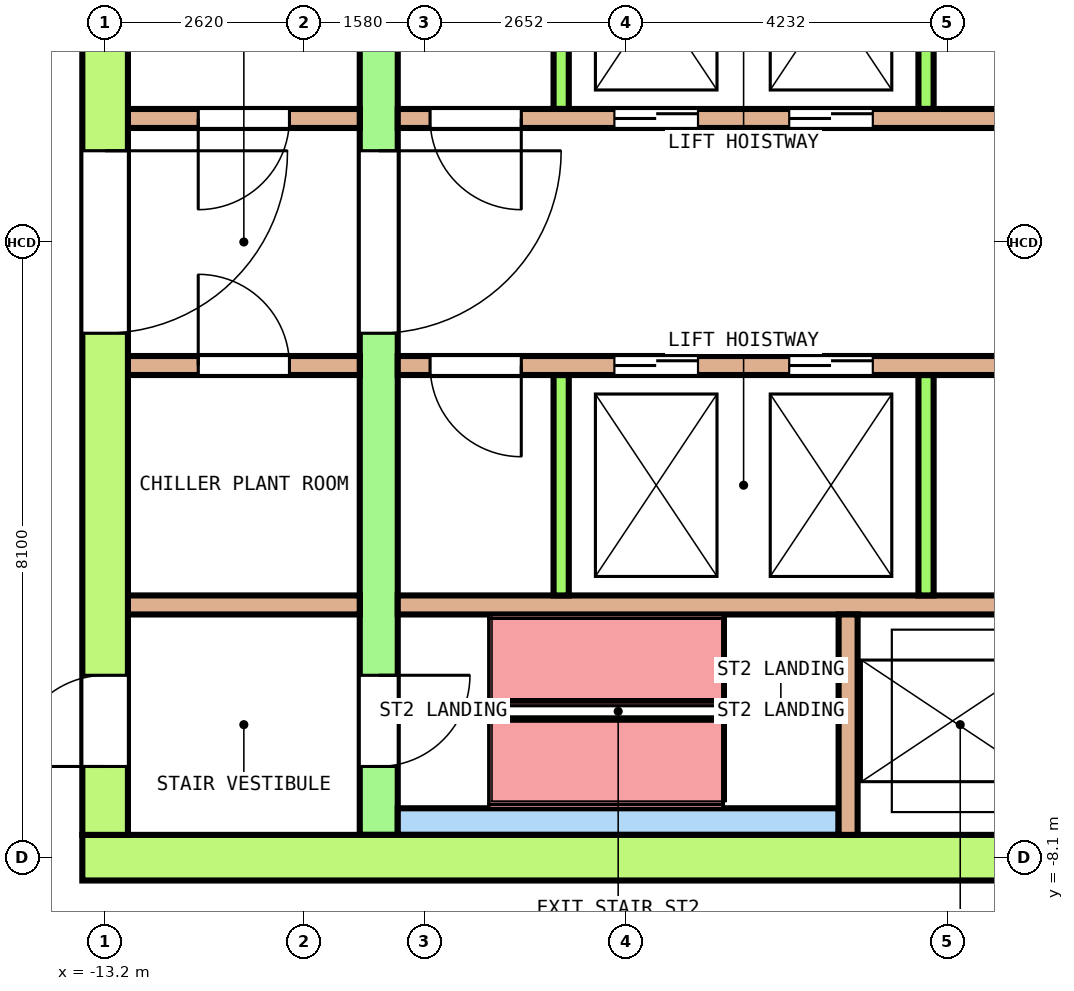
"""IFC4 building model, lengths in metres.
Left out: names, types, materials, properties, quantities, classifications, styles, units other than length and angle.
Written with IfcOpenShell. Run it as: python <this file> out.ifc"""

import sys

from ifc_helpers import new_model, si_unit, direction, frame, frame_2d, origin, place, context, subcontext, project, spatial, rectangle, extrude, element, fill, save


model = new_model("IFC4")
c1 = context("Model", 3, precision=1e-05, world=origin(), true_north=direction((0.0, 1.0)))
c2 = subcontext(c1, "Body", "Model", "MODEL_VIEW")
j1 = project(units=[si_unit("LENGTHUNIT", "METRE"), si_unit("PLANEANGLEUNIT", "RADIAN")], contexts=[c1])
p1 = place(None, origin())
s1 = spatial("IfcSite", under=j1, at=p1, CompositionType="ELEMENT")
p2 = place(p1, origin())
s2 = spatial("IfcBuilding", under=s1, at=p2, CompositionType="ELEMENT")
p3 = place(p2, frame((0.0, 0.0, 202.4)))
s3 = spatial("IfcBuildingStorey", under=s2, at=p3, CompositionType="ELEMENT", Elevation=202.4)
p4 = place(p3, frame((-13.5, -8.1, 0.0), z_axis=(0.0, 0.0, 1.0), x_axis=(1.0, 0.0, 0.0)))
e1 = element("IfcWall", 1, at=p4, inside=s3, PredefinedType="SHEAR", context=c2, shape_type="SweptSolid", body=[
    extrude(rectangle(XDim=27.0, YDim=0.6, at=frame_2d((13.5, 0.0))), origin(), (0.0, 0.0, 1.0), 8.7),
])
p5 = place(p4, frame((15.05, 0.0, 0.0)))
e2 = element("IfcOpeningElement", 2, at=p5, cuts=e1, PredefinedType="OPENING", context=c2, shape_type="SweptSolid", body=[
    extrude(rectangle(XDim=1.2, YDim=2.1, at=frame_2d((0.6, 1.05))), frame((0.0, 0.31, 0.0), z_axis=(0.0, -1.0, 0.0), x_axis=(1.0, 0.0, 0.0)), (0.0, 0.0, 1.0), 0.62),
])
p6 = place(p3, frame((-13.2, -7.8, 0.0), z_axis=(0.0, 0.0, 1.0), x_axis=(0.0, 1.0, 0.0)))
e3 = element("IfcWall", 3, at=p6, inside=s3, PredefinedType="SHEAR", context=c2, shape_type="SweptSolid", body=[
    extrude(rectangle(XDim=15.6, YDim=0.6, at=frame_2d((7.8, 0.0))), origin(), (0.0, 0.0, 1.0), 8.7),
])
p7 = place(p6, frame((6.6, 0.0, 0.0)))
e4 = element("IfcOpeningElement", 4, at=p7, cuts=e3, PredefinedType="OPENING", context=c2, shape_type="SweptSolid", body=[
    extrude(rectangle(XDim=2.4, YDim=2.1, at=frame_2d((1.2, 1.05))), frame((0.0, 0.31, 0.0), z_axis=(0.0, -1.0, 0.0), x_axis=(1.0, 0.0, 0.0)), (0.0, 0.0, 1.0), 0.62),
])
p8 = place(p6, frame((13.5, 0.0, 0.0)))
e5 = element("IfcOpeningElement", 5, at=p8, cuts=e3, PredefinedType="OPENING", context=c2, shape_type="SweptSolid", body=[
    extrude(rectangle(XDim=1.2, YDim=2.1, at=frame_2d((0.6, 1.05))), frame((0.0, 0.31, 0.0), z_axis=(0.0, -1.0, 0.0), x_axis=(1.0, 0.0, 0.0)), (0.0, 0.0, 1.0), 0.62),
])
p9 = place(p6, frame((0.9, 0.0, 0.0)))
e6 = element("IfcOpeningElement", 6, at=p9, cuts=e3, PredefinedType="OPENING", context=c2, shape_type="SweptSolid", body=[
    extrude(rectangle(XDim=1.2, YDim=2.1, at=frame_2d((0.6, 1.05))), frame((0.0, 0.31, 0.0), z_axis=(0.0, -1.0, 0.0), x_axis=(1.0, 0.0, 0.0)), (0.0, 0.0, 1.0), 0.62),
])
p10 = place(p3, frame((-9.6, -7.8, 0.0), z_axis=(0.0, 0.0, 1.0), x_axis=(0.0, 1.0, 0.0)))
e7 = element("IfcWall", 7, at=p10, inside=s3, PredefinedType="SHEAR", context=c2, shape_type="SweptSolid", body=[
    extrude(rectangle(XDim=15.6, YDim=0.5, at=frame_2d((7.8, 0.0))), origin(), (0.0, 0.0, 1.0), 8.7),
])
p11 = place(p10, frame((6.6, 0.0, 0.0)))
e8 = element("IfcOpeningElement", 8, at=p11, cuts=e7, PredefinedType="OPENING", context=c2, shape_type="SweptSolid", body=[
    extrude(rectangle(XDim=2.4, YDim=2.1, at=frame_2d((1.2, 1.05))), frame((0.0, 0.26, 0.0), z_axis=(0.0, -1.0, 0.0), x_axis=(1.0, 0.0, 0.0)), (0.0, 0.0, 1.0), 0.52),
])
p12 = place(p10, frame((13.5, 0.0, 0.0)))
e9 = element("IfcOpeningElement", 9, at=p12, cuts=e7, PredefinedType="OPENING", context=c2, shape_type="SweptSolid", body=[
    extrude(rectangle(XDim=1.2, YDim=2.1, at=frame_2d((0.6, 1.05))), frame((0.0, 0.26, 0.0), z_axis=(0.0, -1.0, 0.0), x_axis=(1.0, 0.0, 0.0)), (0.0, 0.0, 1.0), 0.52),
])
p13 = place(p10, frame((0.9, 0.0, 0.0)))
e10 = element("IfcOpeningElement", 10, at=p13, cuts=e7, PredefinedType="OPENING", context=c2, shape_type="SweptSolid", body=[
    extrude(rectangle(XDim=1.2, YDim=2.1, at=frame_2d((0.6, 1.05))), frame((0.0, 0.26, 0.0), z_axis=(0.0, -1.0, 0.0), x_axis=(1.0, 0.0, 0.0)), (0.0, 0.0, 1.0), 0.52),
])
p14 = place(p3, frame((-12.9, 1.625, 0.0), z_axis=(0.0, 0.0, 1.0), x_axis=(1.0, 0.0, 0.0)))
e11 = element("IfcWall", 11, at=p14, inside=s3, PredefinedType="SOLIDWALL", context=c2, shape_type="SweptSolid", body=[
    extrude(rectangle(XDim=3.05, YDim=0.25, at=frame_2d((1.525, 0.0))), origin(), (0.0, 0.0, 1.0), 8.7),
])
p15 = place(p14, frame((0.925, 0.0, 0.0)))
e12 = element("IfcOpeningElement", 12, at=p15, cuts=e11, PredefinedType="OPENING", context=c2, shape_type="SweptSolid", body=[
    extrude(rectangle(XDim=1.2, YDim=2.1, at=frame_2d((0.6, 1.05))), frame((0.0, 0.135, 0.0), z_axis=(0.0, -1.0, 0.0), x_axis=(1.0, 0.0, 0.0)), (0.0, 0.0, 1.0), 0.27),
])
p16 = place(p3, frame((-9.35, 1.625, 0.0), z_axis=(0.0, 0.0, 1.0), x_axis=(1.0, 0.0, 0.0)))
e13 = element("IfcWall", 13, at=p16, inside=s3, PredefinedType="SOLIDWALL", context=c2, shape_type="SweptSolid", body=[
    extrude(rectangle(XDim=18.7, YDim=0.25, at=frame_2d((9.35, 0.0))), origin(), (0.0, 0.0, 1.0), 8.7),
])
p17 = place(p16, frame((2.85, 0.0, 0.0)))
e14 = element("IfcOpeningElement", 14, at=p17, cuts=e13, PredefinedType="OPENING", context=c2, shape_type="SweptSolid", body=[
    extrude(rectangle(XDim=1.1, YDim=2.1, at=frame_2d((0.55, 1.05))), frame((0.0, 0.135, 0.0), z_axis=(0.0, -1.0, 0.0), x_axis=(1.0, 0.0, 0.0)), (0.0, 0.0, 1.0), 0.27),
])
p18 = place(p16, frame((5.15, 0.0, 0.0)))
e15 = element("IfcOpeningElement", 15, at=p18, cuts=e13, PredefinedType="OPENING", context=c2, shape_type="SweptSolid", body=[
    extrude(rectangle(XDim=1.1, YDim=2.1, at=frame_2d((0.55, 1.05))), frame((0.0, 0.135, 0.0), z_axis=(0.0, -1.0, 0.0), x_axis=(1.0, 0.0, 0.0)), (0.0, 0.0, 1.0), 0.27),
])
p19 = place(p16, frame((14.8, 0.0, 0.0)))
e16 = element("IfcOpeningElement", 16, at=p19, cuts=e13, PredefinedType="OPENING", context=c2, shape_type="SweptSolid", body=[
    extrude(rectangle(XDim=1.1, YDim=2.1, at=frame_2d((0.55, 1.05))), frame((0.0, 0.135, 0.0), z_axis=(0.0, -1.0, 0.0), x_axis=(1.0, 0.0, 0.0)), (0.0, 0.0, 1.0), 0.27),
])
p20 = place(p16, frame((0.425, 0.0, 0.0)))
e17 = element("IfcOpeningElement", 17, at=p20, cuts=e13, PredefinedType="OPENING", context=c2, shape_type="SweptSolid", body=[
    extrude(rectangle(XDim=1.2, YDim=2.1, at=frame_2d((0.6, 1.05))), frame((0.0, 0.135, 0.0), z_axis=(0.0, -1.0, 0.0), x_axis=(1.0, 0.0, 0.0)), (0.0, 0.0, 1.0), 0.27),
])
p21 = place(p16, frame((17.075, 0.0, 0.0)))
e18 = element("IfcOpeningElement", 18, at=p21, cuts=e13, PredefinedType="OPENING", context=c2, shape_type="SweptSolid", body=[
    extrude(rectangle(XDim=1.2, YDim=2.1, at=frame_2d((0.6, 1.05))), frame((0.0, 0.135, 0.0), z_axis=(0.0, -1.0, 0.0), x_axis=(1.0, 0.0, 0.0)), (0.0, 0.0, 1.0), 0.27),
])
for number, where, z_axis, x_axis in (
    (19, (-7.2, 1.75, 0.0), (0.0, 0.0, 1.0), (0.0, 1.0, 0.0)),
    (20, (-2.4, 1.75, 0.0), (0.0, 0.0, 1.0), (0.0, 1.0, 0.0)),
):
    element("IfcWall", number, at=place(p3, frame(where, z_axis=z_axis, x_axis=x_axis)), inside=s3, PredefinedType="SOLIDWALL", context=c2, shape_type="SweptSolid", body=[
        extrude(rectangle(XDim=2.9, YDim=0.2, at=frame_2d((1.45, 0.0))), origin(), (0.0, 0.0, 1.0), 8.7),
    ])
p22 = place(p3, frame((-12.9, -1.625, 0.0), z_axis=(0.0, 0.0, 1.0), x_axis=(1.0, 0.0, 0.0)))
e21 = element("IfcWall", 21, at=p22, inside=s3, PredefinedType="SOLIDWALL", context=c2, shape_type="SweptSolid", body=[
    extrude(rectangle(XDim=3.05, YDim=0.25, at=frame_2d((1.525, 0.0))), origin(), (0.0, 0.0, 1.0), 8.7),
])
p23 = place(p22, frame((0.925, 0.0, 0.0)))
e22 = element("IfcOpeningElement", 22, at=p23, cuts=e21, PredefinedType="OPENING", context=c2, shape_type="SweptSolid", body=[
    extrude(rectangle(XDim=1.2, YDim=2.1, at=frame_2d((0.6, 1.05))), frame((0.0, 0.135, 0.0), z_axis=(0.0, -1.0, 0.0), x_axis=(1.0, 0.0, 0.0)), (0.0, 0.0, 1.0), 0.27),
])
p24 = place(p3, frame((-9.35, -1.625, 0.0), z_axis=(0.0, 0.0, 1.0), x_axis=(1.0, 0.0, 0.0)))
e23 = element("IfcWall", 23, at=p24, inside=s3, PredefinedType="SOLIDWALL", context=c2, shape_type="SweptSolid", body=[
    extrude(rectangle(XDim=18.7, YDim=0.25, at=frame_2d((9.35, 0.0))), origin(), (0.0, 0.0, 1.0), 8.7),
])
p25 = place(p24, frame((2.85, 0.0, 0.0)))
e24 = element("IfcOpeningElement", 24, at=p25, cuts=e23, PredefinedType="OPENING", context=c2, shape_type="SweptSolid", body=[
    extrude(rectangle(XDim=1.1, YDim=2.1, at=frame_2d((0.55, 1.05))), frame((0.0, 0.135, 0.0), z_axis=(0.0, -1.0, 0.0), x_axis=(1.0, 0.0, 0.0)), (0.0, 0.0, 1.0), 0.27),
])
p26 = place(p24, frame((5.15, 0.0, 0.0)))
e25 = element("IfcOpeningElement", 25, at=p26, cuts=e23, PredefinedType="OPENING", context=c2, shape_type="SweptSolid", body=[
    extrude(rectangle(XDim=1.1, YDim=2.1, at=frame_2d((0.55, 1.05))), frame((0.0, 0.135, 0.0), z_axis=(0.0, -1.0, 0.0), x_axis=(1.0, 0.0, 0.0)), (0.0, 0.0, 1.0), 0.27),
])
p27 = place(p24, frame((14.8, 0.0, 0.0)))
e26 = element("IfcOpeningElement", 26, at=p27, cuts=e23, PredefinedType="OPENING", context=c2, shape_type="SweptSolid", body=[
    extrude(rectangle(XDim=1.1, YDim=2.1, at=frame_2d((0.55, 1.05))), frame((0.0, 0.135, 0.0), z_axis=(0.0, -1.0, 0.0), x_axis=(1.0, 0.0, 0.0)), (0.0, 0.0, 1.0), 0.27),
])
p28 = place(p24, frame((0.425, 0.0, 0.0)))
e27 = element("IfcOpeningElement", 27, at=p28, cuts=e23, PredefinedType="OPENING", context=c2, shape_type="SweptSolid", body=[
    extrude(rectangle(XDim=1.2, YDim=2.1, at=frame_2d((0.6, 1.05))), frame((0.0, 0.135, 0.0), z_axis=(0.0, -1.0, 0.0), x_axis=(1.0, 0.0, 0.0)), (0.0, 0.0, 1.0), 0.27),
])
p29 = place(p24, frame((17.075, 0.0, 0.0)))
e28 = element("IfcOpeningElement", 28, at=p29, cuts=e23, PredefinedType="OPENING", context=c2, shape_type="SweptSolid", body=[
    extrude(rectangle(XDim=1.2, YDim=2.1, at=frame_2d((0.6, 1.05))), frame((0.0, 0.135, 0.0), z_axis=(0.0, -1.0, 0.0), x_axis=(1.0, 0.0, 0.0)), (0.0, 0.0, 1.0), 0.27),
])
p30 = place(p3, frame((-12.9, -4.775, 0.0), z_axis=(0.0, 0.0, 1.0), x_axis=(1.0, 0.0, 0.0)))
e29 = element("IfcWall", 29, at=p30, inside=s3, PredefinedType="SOLIDWALL", context=c2, shape_type="SweptSolid", body=[
    extrude(rectangle(XDim=3.05, YDim=0.25, at=frame_2d((1.525, 0.0))), origin(), (0.0, 0.0, 1.0), 8.7),
])
p31 = place(p3, frame((-9.35, -4.775, 0.0), z_axis=(0.0, 0.0, 1.0), x_axis=(1.0, 0.0, 0.0)))
e30 = element("IfcWall", 30, at=p31, inside=s3, PredefinedType="SOLIDWALL", context=c2, shape_type="SweptSolid", body=[
    extrude(rectangle(XDim=18.7, YDim=0.25, at=frame_2d((9.35, 0.0))), origin(), (0.0, 0.0, 1.0), 8.7),
])
for number, where, z_axis, x_axis in (
    (31, (-7.2, -4.65, 0.0), (0.0, 0.0, 1.0), (0.0, 1.0, 0.0)),
    (32, (-2.4, -4.65, 0.0), (0.0, 0.0, 1.0), (0.0, 1.0, 0.0)),
):
    element("IfcWall", number, at=place(p3, frame(where, z_axis=z_axis, x_axis=x_axis)), inside=s3, PredefinedType="SOLIDWALL", context=c2, shape_type="SweptSolid", body=[
        extrude(rectangle(XDim=2.9, YDim=0.2, at=frame_2d((1.45, 0.0))), origin(), (0.0, 0.0, 1.0), 8.7),
    ])
p32 = place(p3, frame((-9.35, -7.625, 0.0), z_axis=(0.0, 0.0, 1.0), x_axis=(1.0, 0.0, 0.0)))
e33 = element("IfcWall", 33, at=p32, inside=s3, PredefinedType="SOLIDWALL", context=c2, shape_type="SweptSolid", body=[
    extrude(rectangle(XDim=5.8, YDim=0.35, at=frame_2d((2.9, 0.0))), origin(), (0.0, 0.0, 1.0), 8.7),
])
p33 = place(p3, frame((-3.425, -7.8, 0.0), z_axis=(0.0, 0.0, 1.0), x_axis=(0.0, 1.0, 0.0)))
e34 = element("IfcWall", 34, at=p33, inside=s3, PredefinedType="SOLIDWALL", context=c2, shape_type="SweptSolid", body=[
    extrude(rectangle(XDim=2.9, YDim=0.25, at=frame_2d((1.45, 0.0))), origin(), (0.0, 0.0, 1.0), 8.7),
])
p34 = place(p17, origin())
e35 = element("IfcDoor", 35, at=p34, inside=s3, OperationType="DOUBLE_DOOR_SLIDING", PredefinedType="DOOR", context=c2, shape_type="SweptSolid", body=[
    extrude(rectangle(XDim=1.1, YDim=2.1, at=frame_2d((0.55, 1.05))), frame((0.0, 0.075, 0.0), z_axis=(0.0, -1.0, 0.0), x_axis=(1.0, 0.0, 0.0)), (0.0, 0.0, 1.0), 0.15),
])
fill(e14, e35)
p35 = place(p18, origin())
e36 = element("IfcDoor", 36, at=p35, inside=s3, OperationType="DOUBLE_DOOR_SLIDING", PredefinedType="DOOR", context=c2, shape_type="SweptSolid", body=[
    extrude(rectangle(XDim=1.1, YDim=2.1, at=frame_2d((0.55, 1.05))), frame((0.0, 0.075, 0.0), z_axis=(0.0, -1.0, 0.0), x_axis=(1.0, 0.0, 0.0)), (0.0, 0.0, 1.0), 0.15),
])
fill(e15, e36)
p36 = place(p25, origin())
e37 = element("IfcDoor", 37, at=p36, inside=s3, OperationType="DOUBLE_DOOR_SLIDING", PredefinedType="DOOR", context=c2, shape_type="SweptSolid", body=[
    extrude(rectangle(XDim=1.1, YDim=2.1, at=frame_2d((0.55, 1.05))), frame((0.0, 0.075, 0.0), z_axis=(0.0, -1.0, 0.0), x_axis=(1.0, 0.0, 0.0)), (0.0, 0.0, 1.0), 0.15),
])
fill(e24, e37)
p37 = place(p26, origin())
e38 = element("IfcDoor", 38, at=p37, inside=s3, OperationType="DOUBLE_DOOR_SLIDING", PredefinedType="DOOR", context=c2, shape_type="SweptSolid", body=[
    extrude(rectangle(XDim=1.1, YDim=2.1, at=frame_2d((0.55, 1.05))), frame((0.0, 0.075, 0.0), z_axis=(0.0, -1.0, 0.0), x_axis=(1.0, 0.0, 0.0)), (0.0, 0.0, 1.0), 0.15),
])
fill(e25, e38)
p38 = place(p11, origin())
e39 = element("IfcDoor", 39, at=p38, inside=s3, OperationType="DOUBLE_DOOR_SINGLE_SWING", PredefinedType="DOOR", context=c2, shape_type="SweptSolid", body=[
    extrude(rectangle(XDim=2.4, YDim=2.1, at=frame_2d((1.2, 1.05))), frame((0.0, 0.2, 0.0), z_axis=(0.0, -1.0, 0.0), x_axis=(1.0, 0.0, 0.0)), (0.0, 0.0, 1.0), 0.4),
])
fill(e8, e39)
p39 = place(p7, origin())
e40 = element("IfcDoor", 40, at=p39, inside=s3, OperationType="DOUBLE_DOOR_SINGLE_SWING", PredefinedType="DOOR", context=c2, shape_type="SweptSolid", body=[
    extrude(rectangle(XDim=2.4, YDim=2.1, at=frame_2d((1.2, 1.05))), frame((0.0, 0.25, 0.0), z_axis=(0.0, -1.0, 0.0), x_axis=(1.0, 0.0, 0.0)), (0.0, 0.0, 1.0), 0.5),
])
fill(e4, e40)
p40 = place(p13, origin())
e41 = element("IfcDoor", 41, at=p40, inside=s3, OperationType="SINGLE_SWING_RIGHT", PredefinedType="DOOR", context=c2, shape_type="SweptSolid", body=[
    extrude(rectangle(XDim=1.2, YDim=2.1, at=frame_2d((0.6, 1.05))), frame((0.0, 0.2, 0.0), z_axis=(0.0, -1.0, 0.0), x_axis=(1.0, 0.0, 0.0)), (0.0, 0.0, 1.0), 0.4),
])
fill(e10, e41)
p41 = place(p9, origin())
e42 = element("IfcDoor", 42, at=p41, inside=s3, OperationType="SINGLE_SWING_LEFT", PredefinedType="DOOR", context=c2, shape_type="SweptSolid", body=[
    extrude(rectangle(XDim=1.2, YDim=2.1, at=frame_2d((0.6, 1.05))), frame((0.0, 0.25, 0.0), z_axis=(0.0, -1.0, 0.0), x_axis=(1.0, 0.0, 0.0)), (0.0, 0.0, 1.0), 0.5),
])
fill(e6, e42)
p42 = place(p15, origin())
e43 = element("IfcDoor", 43, at=p42, inside=s3, OperationType="SINGLE_SWING_RIGHT", PredefinedType="DOOR", context=c2, shape_type="SweptSolid", body=[
    extrude(rectangle(XDim=1.2, YDim=2.1, at=frame_2d((0.6, 1.05))), frame((0.0, 0.075, 0.0), z_axis=(0.0, -1.0, 0.0), x_axis=(1.0, 0.0, 0.0)), (0.0, 0.0, 1.0), 0.15),
])
fill(e12, e43)
p43 = place(p20, origin())
e44 = element("IfcDoor", 44, at=p43, inside=s3, OperationType="SINGLE_SWING_LEFT", PredefinedType="DOOR", context=c2, shape_type="SweptSolid", body=[
    extrude(rectangle(XDim=1.2, YDim=2.1, at=frame_2d((0.6, 1.05))), frame((0.0, 0.075, 0.0), z_axis=(0.0, -1.0, 0.0), x_axis=(1.0, 0.0, 0.0)), (0.0, 0.0, 1.0), 0.15),
])
fill(e17, e44)
p44 = place(p23, origin())
e45 = element("IfcDoor", 45, at=p44, inside=s3, OperationType="SINGLE_SWING_RIGHT", PredefinedType="DOOR", context=c2, shape_type="SweptSolid", body=[
    extrude(rectangle(XDim=1.2, YDim=2.1, at=frame_2d((0.6, 1.05))), frame((0.0, 0.075, 0.0), z_axis=(0.0, -1.0, 0.0), x_axis=(1.0, 0.0, 0.0)), (0.0, 0.0, 1.0), 0.15),
])
fill(e22, e45)
p45 = place(p28, origin())
e46 = element("IfcDoor", 46, at=p45, inside=s3, OperationType="SINGLE_SWING_LEFT", PredefinedType="DOOR", context=c2, shape_type="SweptSolid", body=[
    extrude(rectangle(XDim=1.2, YDim=2.1, at=frame_2d((0.6, 1.05))), frame((0.0, 0.075, 0.0), z_axis=(0.0, -1.0, 0.0), x_axis=(1.0, 0.0, 0.0)), (0.0, 0.0, 1.0), 0.15),
])
fill(e27, e46)
save(model, sys.argv[1])
